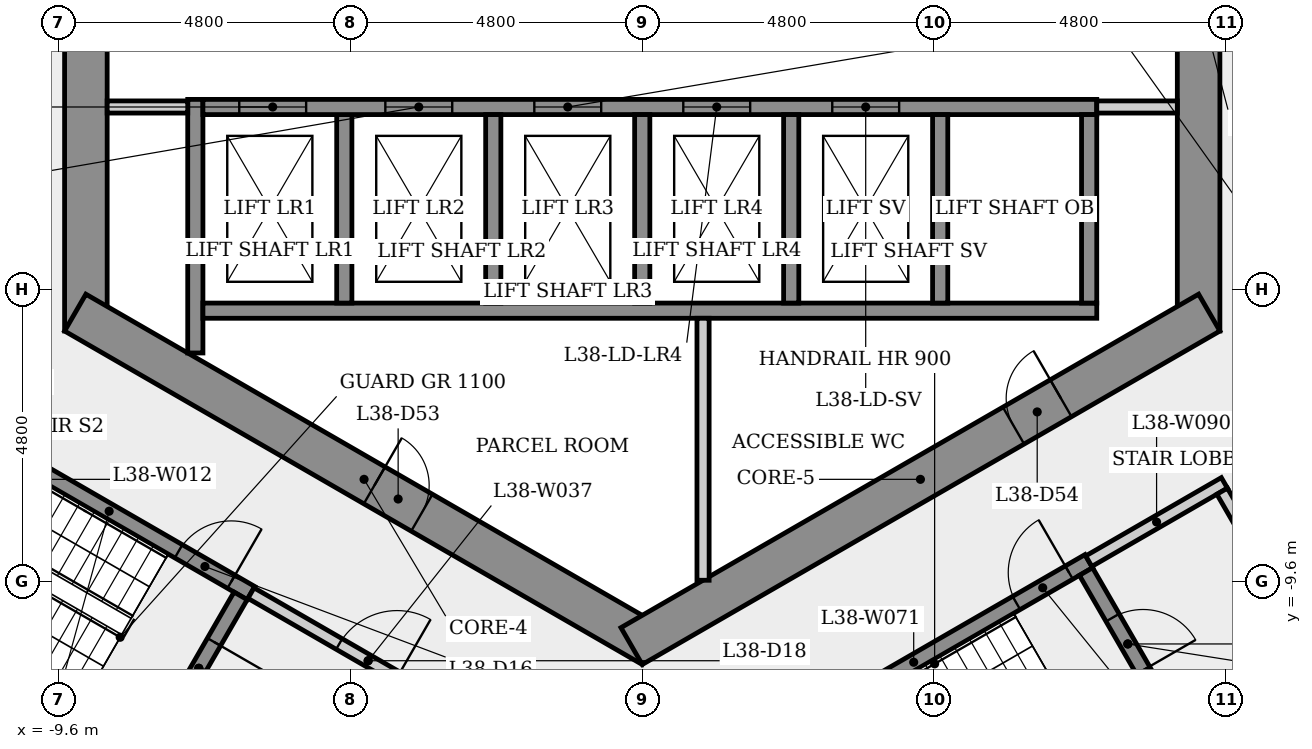
"""IFC4 building model, lengths in metres.
Left out: names, types, materials, properties, quantities, classifications, styles, units other than length and angle.
Written with IfcOpenShell. Run it as: python <this file> out.ifc"""

import sys

from ifc_helpers import new_model, si_unit, direction, frame, frame_2d, origin, place, context, subcontext, project, spatial, rectangle, extrude, element, fill, save


model = new_model("IFC4")
c1 = context("Model", 3, precision=1e-05, world=origin(), true_north=direction((0.0, 1.0)))
c2 = subcontext(c1, "Body", "Model", "MODEL_VIEW")
j1 = project(units=[si_unit("LENGTHUNIT", "METRE"), si_unit("PLANEANGLEUNIT", "RADIAN")], contexts=[c1])
p1 = place(None, origin())
s1 = spatial("IfcSite", under=j1, at=p1, CompositionType="ELEMENT")
p2 = place(p1, origin())
s2 = spatial("IfcBuilding", under=s1, at=p2, CompositionType="ELEMENT")
p3 = place(p2, frame((0.0, 0.0, 143.9)))
s3 = spatial("IfcBuildingStorey", under=s2, at=p3, CompositionType="ELEMENT", Elevation=143.9)
p4 = place(p3, frame((9.15, -5.485, 0.0), z_axis=(0.0, 0.0, 1.0), x_axis=(0.0, 1.0, 0.0)))
e1 = element("IfcWall", 1, at=p4, inside=s3, PredefinedType="SHEAR", context=c2, shape_type="SweptSolid", body=[
    extrude(rectangle(XDim=10.97, YDim=0.7, at=frame_2d((5.485, 0.0))), origin(), (0.0, 0.0, 1.0), 4.0),
])
p5 = place(p4, frame((4.685, 0.0, 0.0)))
e2 = element("IfcOpeningElement", 2, at=p5, cuts=e1, PredefinedType="OPENING", context=c2, shape_type="SweptSolid", body=[
    extrude(rectangle(XDim=1.6, YDim=2.1, at=frame_2d((0.8, 1.05))), frame((0.0, 0.36, 0.0), z_axis=(0.0, -1.0, 0.0), x_axis=(1.0, 0.0, 0.0)), (0.0, 0.0, 1.0), 0.72),
])
p6 = place(p3, frame((-9.15, 5.485, 0.0), z_axis=(0.0, 0.0, 1.0), x_axis=(0.0, -1.0, 0.0)))
e3 = element("IfcWall", 3, at=p6, inside=s3, PredefinedType="SHEAR", context=c2, shape_type="SweptSolid", body=[
    extrude(rectangle(XDim=10.97, YDim=0.7, at=frame_2d((5.485, 0.0))), origin(), (0.0, 0.0, 1.0), 4.0),
])
p7 = place(p6, frame((4.685, 0.0, 0.0)))
e4 = element("IfcOpeningElement", 4, at=p7, cuts=e3, PredefinedType="OPENING", context=c2, shape_type="SweptSolid", body=[
    extrude(rectangle(XDim=1.6, YDim=2.1, at=frame_2d((0.8, 1.05))), frame((0.0, 0.36, 0.0), z_axis=(0.0, -1.0, 0.0), x_axis=(1.0, 0.0, 0.0)), (0.0, 0.0, 1.0), 0.72),
])
p8 = place(p3, frame((-9.325, -5.182, 0.0), z_axis=(0.0, 0.0, 1.0), x_axis=(0.866023993627, -0.500002442456, 0.0)))
e5 = element("IfcWall", 5, at=p8, inside=s3, PredefinedType="SHEAR", context=c2, shape_type="SweptSolid", body=[
    extrude(rectangle(XDim=10.97, YDim=0.7, at=frame_2d((5.485, 0.0))), origin(), (0.0, 0.0, 1.0), 4.0),
])
p9 = place(p8, frame((5.682, 0.0, 0.0)))
e6 = element("IfcOpeningElement", 6, at=p9, cuts=e5, PredefinedType="OPENING", context=c2, shape_type="SweptSolid", body=[
    extrude(rectangle(XDim=0.9, YDim=2.1, at=frame_2d((0.45, 1.05))), frame((0.0, 0.36, 0.0), z_axis=(0.0, -1.0, 0.0), x_axis=(1.0, 0.0, 0.0)), (0.0, 0.0, 1.0), 0.72),
])
p10 = place(p3, frame((-0.175, -10.667, 0.0), z_axis=(0.0, 0.0, 1.0), x_axis=(0.866023993627, 0.500002442456, 0.0)))
e7 = element("IfcWall", 7, at=p10, inside=s3, PredefinedType="SHEAR", context=c2, shape_type="SweptSolid", body=[
    extrude(rectangle(XDim=10.97, YDim=0.7, at=frame_2d((5.485, 0.0))), origin(), (0.0, 0.0, 1.0), 4.0),
])
p11 = place(p10, frame((7.252, 0.0, 0.0)))
e8 = element("IfcOpeningElement", 8, at=p11, cuts=e7, PredefinedType="OPENING", context=c2, shape_type="SweptSolid", body=[
    extrude(rectangle(XDim=0.9, YDim=2.1, at=frame_2d((0.45, 1.05))), frame((0.0, 0.36, 0.0), z_axis=(0.0, -1.0, 0.0), x_axis=(1.0, 0.0, 0.0)), (0.0, 0.0, 1.0), 0.72),
])
p12 = place(p3, frame((-11.1, -7.101, 0.0), z_axis=(0.0, 0.0, 1.0), x_axis=(0.866028615007, -0.499994437958, 0.0)))
e9 = element("IfcWall", 9, at=p12, inside=s3, PredefinedType="SHEAR", context=c2, shape_type="SweptSolid", body=[
    extrude(rectangle(XDim=5.387, YDim=0.25, at=frame_2d((2.694, 0.0))), origin(), (0.0, 0.0, 1.0), 3.6),
])
p13 = place(p12, frame((4.012, 0.0, 0.0)))
e10 = element("IfcOpeningElement", 10, at=p13, cuts=e9, PredefinedType="OPENING", context=c2, shape_type="SweptSolid", body=[
    extrude(rectangle(XDim=1.0, YDim=2.1, at=frame_2d((0.5, 1.05))), frame((0.0, 0.135, 0.0), z_axis=(0.0, -1.0, 0.0), x_axis=(1.0, 0.0, 0.0)), (0.0, 0.0, 1.0), 0.27),
])
p14 = place(p3, frame((-7.935, -12.393, 0.0), z_axis=(0.0, 0.0, 1.0), x_axis=(-0.866025499775, 0.499999833739, 0.0)))
e11 = element("IfcWall", 11, at=p14, inside=s3, PredefinedType="SHEAR", context=c2, shape_type="SweptSolid", body=[
    extrude(rectangle(XDim=6.4, YDim=0.25, at=frame_2d((3.2, 0.0))), origin(), (0.0, 0.0, 1.0), 3.6),
])
p15 = place(p3, frame((-7.35, -5.846, 0.0), z_axis=(0.0, 0.0, 1.0), x_axis=(0.0, 1.0, 0.0)))
e12 = element("IfcWall", 12, at=p15, inside=s3, PredefinedType="SHEAR", context=c2, shape_type="SweptSolid", body=[
    extrude(rectangle(XDim=4.171, YDim=0.25, at=frame_2d((2.085, 0.0))), origin(), (0.0, 0.0, 1.0), 3.6),
])
p16 = place(p3, frame((-7.475, -1.8, 0.0), z_axis=(0.0, 0.0, 1.0), x_axis=(-1.0, 0.0, 0.0)))
e13 = element("IfcWall", 13, at=p16, inside=s3, PredefinedType="PARTITIONING", context=c2, shape_type="SweptSolid", body=[
    extrude(rectangle(XDim=1.325, YDim=0.2, at=frame_2d((0.663, 0.0))), origin(), (0.0, 0.0, 1.0), 3.6),
])
p17 = place(p3, frame((-6.605, -9.841, 0.0), z_axis=(0.0, 0.0, 1.0), x_axis=(-0.499996545922, -0.866027397988, 0.0)))
e14 = element("IfcWall", 14, at=p17, inside=s3, PredefinedType="SHEAR", context=c2, shape_type="SweptSolid", body=[
    extrude(rectangle(XDim=2.75, YDim=0.25, at=frame_2d((1.375, 0.0))), origin(), (0.0, 0.0, 1.0), 3.6),
])
p18 = place(p17, frame((0.875, 0.0, 0.0)))
e15 = element("IfcOpeningElement", 15, at=p18, cuts=e14, PredefinedType="OPENING", context=c2, shape_type="SweptSolid", body=[
    extrude(rectangle(XDim=1.0, YDim=2.1, at=frame_2d((0.5, 1.05))), frame((0.0, 0.135, 0.0), z_axis=(0.0, -1.0, 0.0), x_axis=(1.0, 0.0, 0.0)), (0.0, 0.0, 1.0), 0.27),
])
p19 = place(p3, frame((-6.435, -9.795, 0.0), z_axis=(0.0, 0.0, 1.0), x_axis=(0.866012907634, -0.500021643343, 0.0)))
e16 = element("IfcWall", 16, at=p19, inside=s3, PredefinedType="PARTITIONING", context=c2, shape_type="SweptSolid", body=[
    extrude(rectangle(XDim=4.45, YDim=0.2, at=frame_2d((2.225, 0.0))), origin(), (0.0, 0.0, 1.0), 3.6),
])
p20 = place(p19, frame((1.675, 0.0, 0.0)))
e17 = element("IfcOpeningElement", 17, at=p20, cuts=e16, PredefinedType="OPENING", context=c2, shape_type="SweptSolid", body=[
    extrude(rectangle(XDim=1.1, YDim=2.1, at=frame_2d((0.55, 1.05))), frame((0.0, 0.11, 0.0), z_axis=(0.0, -1.0, 0.0), x_axis=(1.0, 0.0, 0.0)), (0.0, 0.0, 1.0), 0.22),
])
p21 = place(p3, frame((-7.225, -5.15, 0.0), z_axis=(0.0, 0.0, 1.0), x_axis=(1.0, 0.0, 0.0)))
e18 = element("IfcWall", 18, at=p21, inside=s3, PredefinedType="SHEAR", context=c2, shape_type="SweptSolid", body=[
    extrude(rectangle(XDim=14.7, YDim=0.25, at=frame_2d((7.35, 0.0))), origin(), (0.0, 0.0, 1.0), 3.6),
])
p22 = place(p3, frame((-4.9, -1.925, 0.0), z_axis=(0.0, 0.0, 1.0), x_axis=(0.0, -1.0, 0.0)))
e19 = element("IfcWall", 19, at=p22, inside=s3, PredefinedType="SHEAR", context=c2, shape_type="SweptSolid", body=[
    extrude(rectangle(XDim=3.1, YDim=0.25, at=frame_2d((1.55, 0.0))), origin(), (0.0, 0.0, 1.0), 4.0),
])
p23 = place(p3, frame((-7.225, -1.8, 0.0), z_axis=(0.0, 0.0, 1.0), x_axis=(1.0, 0.0, 0.0)))
e20 = element("IfcWall", 20, at=p23, inside=s3, PredefinedType="SHEAR", context=c2, shape_type="SweptSolid", body=[
    extrude(rectangle(XDim=14.7, YDim=0.25, at=frame_2d((7.35, 0.0))), origin(), (0.0, 0.0, 1.0), 3.6),
])
p24 = place(p23, frame((0.597, 0.0, 0.0)))
e21 = element("IfcOpeningElement", 21, at=p24, cuts=e20, PredefinedType="OPENING", context=c2, shape_type="SweptSolid", body=[
    extrude(rectangle(XDim=1.1, YDim=2.1, at=frame_2d((0.55, 1.05))), frame((0.0, 0.135, 0.0), z_axis=(0.0, -1.0, 0.0), x_axis=(1.0, 0.0, 0.0)), (0.0, 0.0, 1.0), 0.27),
])
p25 = place(p23, frame((3.0, 0.0, 0.0)))
e22 = element("IfcOpeningElement", 22, at=p25, cuts=e20, PredefinedType="OPENING", context=c2, shape_type="SweptSolid", body=[
    extrude(rectangle(XDim=1.1, YDim=2.1, at=frame_2d((0.55, 1.05))), frame((0.0, 0.135, 0.0), z_axis=(0.0, -1.0, 0.0), x_axis=(1.0, 0.0, 0.0)), (0.0, 0.0, 1.0), 0.27),
])
p26 = place(p23, frame((5.45, 0.0, 0.0)))
e23 = element("IfcOpeningElement", 23, at=p26, cuts=e20, PredefinedType="OPENING", context=c2, shape_type="SweptSolid", body=[
    extrude(rectangle(XDim=1.1, YDim=2.1, at=frame_2d((0.55, 1.05))), frame((0.0, 0.135, 0.0), z_axis=(0.0, -1.0, 0.0), x_axis=(1.0, 0.0, 0.0)), (0.0, 0.0, 1.0), 0.27),
])
p27 = place(p23, frame((7.9, 0.0, 0.0)))
e24 = element("IfcOpeningElement", 24, at=p27, cuts=e20, PredefinedType="OPENING", context=c2, shape_type="SweptSolid", body=[
    extrude(rectangle(XDim=1.1, YDim=2.1, at=frame_2d((0.55, 1.05))), frame((0.0, 0.135, 0.0), z_axis=(0.0, -1.0, 0.0), x_axis=(1.0, 0.0, 0.0)), (0.0, 0.0, 1.0), 0.27),
])
p28 = place(p23, frame((10.35, 0.0, 0.0)))
e25 = element("IfcOpeningElement", 25, at=p28, cuts=e20, PredefinedType="OPENING", context=c2, shape_type="SweptSolid", body=[
    extrude(rectangle(XDim=1.1, YDim=2.1, at=frame_2d((0.55, 1.05))), frame((0.0, 0.135, 0.0), z_axis=(0.0, -1.0, 0.0), x_axis=(1.0, 0.0, 0.0)), (0.0, 0.0, 1.0), 0.27),
])
for number, where, z_axis, x_axis in (
    (26, (-2.45, -1.925, 0.0), (0.0, 0.0, 1.0), (0.0, -1.0, 0.0)),
    (27, (0.0, -1.925, 0.0), (0.0, 0.0, 1.0), (0.0, -1.0, 0.0)),
):
    element("IfcWall", number, at=place(p3, frame(where, z_axis=z_axis, x_axis=x_axis)), inside=s3, PredefinedType="SHEAR", context=c2, shape_type="SweptSolid", body=[
        extrude(rectangle(XDim=3.1, YDim=0.25, at=frame_2d((1.55, 0.0))), origin(), (0.0, 0.0, 1.0), 4.0),
    ])
p29 = place(p3, frame((1.0, -5.275, 0.0), z_axis=(0.0, 0.0, 1.0), x_axis=(0.0, -1.0, 0.0)))
e28 = element("IfcWall", 28, at=p29, inside=s3, PredefinedType="PARTITIONING", context=c2, shape_type="SweptSolid", body=[
    extrude(rectangle(XDim=4.309, YDim=0.2, at=frame_2d((2.155, 0.0))), origin(), (0.0, 0.0, 1.0), 3.6),
])
p30 = place(p3, frame((1.585, -12.595, 0.0), z_axis=(0.0, 0.0, 1.0), x_axis=(0.866036417653, 0.499980922934, 0.0)))
e29 = element("IfcWall", 29, at=p30, inside=s3, PredefinedType="SHEAR", context=c2, shape_type="SweptSolid", body=[
    extrude(rectangle(XDim=6.65, YDim=0.25, at=frame_2d((3.325, 0.0))), origin(), (0.0, 0.0, 1.0), 3.6),
])
p31 = place(p30, frame((5.275, 0.0, 0.0)))
e30 = element("IfcOpeningElement", 30, at=p31, cuts=e29, PredefinedType="OPENING", context=c2, shape_type="SweptSolid", body=[
    extrude(rectangle(XDim=1.0, YDim=2.1, at=frame_2d((0.5, 1.05))), frame((0.0, 0.135, 0.0), z_axis=(0.0, -1.0, 0.0), x_axis=(1.0, 0.0, 0.0)), (0.0, 0.0, 1.0), 0.27),
])
for number, where, z_axis, x_axis in (
    (31, (2.45, -1.925, 0.0), (0.0, 0.0, 1.0), (0.0, -1.0, 0.0)),
    (32, (4.9, -1.925, 0.0), (0.0, 0.0, 1.0), (0.0, -1.0, 0.0)),
):
    element("IfcWall", number, at=place(p3, frame(where, z_axis=z_axis, x_axis=x_axis)), inside=s3, PredefinedType="SHEAR", context=c2, shape_type="SweptSolid", body=[
        extrude(rectangle(XDim=3.1, YDim=0.25, at=frame_2d((1.55, 0.0))), origin(), (0.0, 0.0, 1.0), 4.0),
    ])
p32 = place(p3, frame((7.298, -9.441, 0.0), z_axis=(0.0, 0.0, 1.0), x_axis=(0.500034990121, -0.866005201286, 0.0)))
e33 = element("IfcWall", 33, at=p32, inside=s3, PredefinedType="SHEAR", context=c2, shape_type="SweptSolid", body=[
    extrude(rectangle(XDim=2.75, YDim=0.25, at=frame_2d((1.375, 0.0))), origin(), (0.0, 0.0, 1.0), 3.6),
])
p33 = place(p32, frame((0.875, 0.0, 0.0)))
e34 = element("IfcOpeningElement", 34, at=p33, cuts=e33, PredefinedType="OPENING", context=c2, shape_type="SweptSolid", body=[
    extrude(rectangle(XDim=1.0, YDim=2.1, at=frame_2d((0.5, 1.05))), frame((0.0, 0.135, 0.0), z_axis=(0.0, -1.0, 0.0), x_axis=(1.0, 0.0, 0.0)), (0.0, 0.0, 1.0), 0.27),
])
p34 = place(p3, frame((7.344, -9.27, 0.0), z_axis=(0.0, 0.0, 1.0), x_axis=(0.866005588531, 0.500034319456, 0.0)))
e35 = element("IfcWall", 35, at=p34, inside=s3, PredefinedType="PARTITIONING", context=c2, shape_type="SweptSolid", body=[
    extrude(rectangle(XDim=2.575, YDim=0.2, at=frame_2d((1.288, 0.0))), origin(), (0.0, 0.0, 1.0), 3.6),
])
p35 = place(p3, frame((7.35, -1.925, 0.0), z_axis=(0.0, 0.0, 1.0), x_axis=(0.0, -1.0, 0.0)))
e36 = element("IfcWall", 36, at=p35, inside=s3, PredefinedType="SHEAR", context=c2, shape_type="SweptSolid", body=[
    extrude(rectangle(XDim=3.1, YDim=0.25, at=frame_2d((1.55, 0.0))), origin(), (0.0, 0.0, 1.0), 4.0),
])
p36 = place(p3, frame((8.8, -1.8, 0.0), z_axis=(0.0, 0.0, 1.0), x_axis=(-1.0, 0.0, 0.0)))
e37 = element("IfcWall", 37, at=p36, inside=s3, PredefinedType="PARTITIONING", context=c2, shape_type="SweptSolid", body=[
    extrude(rectangle(XDim=1.325, YDim=0.2, at=frame_2d((0.663, 0.0))), origin(), (0.0, 0.0, 1.0), 3.6),
])
p37 = place(p3, frame((9.537, -8.119, 0.0), z_axis=(0.0, 0.0, 1.0), x_axis=(0.499990139034, -0.866031096941, 0.0)))
e38 = element("IfcWall", 38, at=p37, inside=s3, PredefinedType="PARTITIONING", context=c2, shape_type="SweptSolid", body=[
    extrude(rectangle(XDim=3.0, YDim=0.2, at=frame_2d((1.5, 0.0))), origin(), (0.0, 0.0, 1.0), 3.6),
])
p38 = place(p37, frame((0.935, 0.0, 0.0)))
e39 = element("IfcOpeningElement", 39, at=p38, cuts=e38, PredefinedType="OPENING", context=c2, shape_type="SweptSolid", body=[
    extrude(rectangle(XDim=1.0, YDim=2.1, at=frame_2d((0.5, 1.05))), frame((0.0, 0.11, 0.0), z_axis=(0.0, -1.0, 0.0), x_axis=(1.0, 0.0, 0.0)), (0.0, 0.0, 1.0), 0.22),
])
p39 = place(p3, frame((10.901, -10.681, 0.0), z_axis=(0.0, 0.0, 1.0), x_axis=(-0.866007538022, -0.500030943131, 0.0)))
e40 = element("IfcWall", 40, at=p39, inside=s3, PredefinedType="PLUMBINGWALL", context=c2, shape_type="SweptSolid", body=[
    extrude(rectangle(XDim=2.375, YDim=0.2, at=frame_2d((1.188, 0.0))), origin(), (0.0, 0.0, 1.0), 3.6),
])
p40 = place(p24, origin())
e41 = element("IfcDoor", 41, at=p40, inside=s3, OperationType="SLIDING_TO_LEFT", PredefinedType="DOOR", context=c2, shape_type="SweptSolid", body=[
    extrude(rectangle(XDim=1.1, YDim=2.1, at=frame_2d((0.55, 1.05))), frame((0.0, 0.025, 0.0), z_axis=(0.0, -1.0, 0.0), x_axis=(1.0, 0.0, 0.0)), (0.0, 0.0, 1.0), 0.05),
])
fill(e21, e41)
p41 = place(p25, origin())
e42 = element("IfcDoor", 42, at=p41, inside=s3, OperationType="SLIDING_TO_LEFT", PredefinedType="DOOR", context=c2, shape_type="SweptSolid", body=[
    extrude(rectangle(XDim=1.1, YDim=2.1, at=frame_2d((0.55, 1.05))), frame((0.0, 0.025, 0.0), z_axis=(0.0, -1.0, 0.0), x_axis=(1.0, 0.0, 0.0)), (0.0, 0.0, 1.0), 0.05),
])
fill(e22, e42)
p42 = place(p26, origin())
e43 = element("IfcDoor", 43, at=p42, inside=s3, OperationType="SLIDING_TO_LEFT", PredefinedType="DOOR", context=c2, shape_type="SweptSolid", body=[
    extrude(rectangle(XDim=1.1, YDim=2.1, at=frame_2d((0.55, 1.05))), frame((0.0, 0.025, 0.0), z_axis=(0.0, -1.0, 0.0), x_axis=(1.0, 0.0, 0.0)), (0.0, 0.0, 1.0), 0.05),
])
fill(e23, e43)
p43 = place(p27, origin())
e44 = element("IfcDoor", 44, at=p43, inside=s3, OperationType="SLIDING_TO_LEFT", PredefinedType="DOOR", context=c2, shape_type="SweptSolid", body=[
    extrude(rectangle(XDim=1.1, YDim=2.1, at=frame_2d((0.55, 1.05))), frame((0.0, 0.025, 0.0), z_axis=(0.0, -1.0, 0.0), x_axis=(1.0, 0.0, 0.0)), (0.0, 0.0, 1.0), 0.05),
])
fill(e24, e44)
p44 = place(p28, origin())
e45 = element("IfcDoor", 45, at=p44, inside=s3, OperationType="SLIDING_TO_LEFT", PredefinedType="DOOR", context=c2, shape_type="SweptSolid", body=[
    extrude(rectangle(XDim=1.1, YDim=2.1, at=frame_2d((0.55, 1.05))), frame((0.0, 0.025, 0.0), z_axis=(0.0, -1.0, 0.0), x_axis=(1.0, 0.0, 0.0)), (0.0, 0.0, 1.0), 0.05),
])
fill(e25, e45)
p45 = place(p13, origin())
e46 = element("IfcDoor", 46, at=p45, inside=s3, OperationType="SINGLE_SWING_RIGHT", PredefinedType="DOOR", context=c2, shape_type="SweptSolid", body=[
    extrude(rectangle(XDim=1.0, YDim=2.1, at=frame_2d((0.5, 1.05))), frame((0.0, 0.025, 0.0), z_axis=(0.0, -1.0, 0.0), x_axis=(1.0, 0.0, 0.0)), (0.0, 0.0, 1.0), 0.05),
])
fill(e10, e46)
p46 = place(p18, origin())
e47 = element("IfcDoor", 47, at=p46, inside=s3, OperationType="SINGLE_SWING_LEFT", PredefinedType="DOOR", context=c2, shape_type="SweptSolid", body=[
    extrude(rectangle(XDim=1.0, YDim=2.1, at=frame_2d((0.5, 1.05))), frame((0.0, 0.025, 0.0), z_axis=(0.0, -1.0, 0.0), x_axis=(1.0, 0.0, 0.0)), (0.0, 0.0, 1.0), 0.05),
])
fill(e15, e47)
p47 = place(p20, origin())
e48 = element("IfcDoor", 48, at=p47, inside=s3, OperationType="SINGLE_SWING_RIGHT", PredefinedType="DOOR", context=c2, shape_type="SweptSolid", body=[
    extrude(rectangle(XDim=1.1, YDim=2.1, at=frame_2d((0.55, 1.05))), frame((0.0, 0.025, 0.0), z_axis=(0.0, -1.0, 0.0), x_axis=(1.0, 0.0, 0.0)), (0.0, 0.0, 1.0), 0.05),
])
fill(e17, e48)
p48 = place(p31, origin())
e49 = element("IfcDoor", 49, at=p48, inside=s3, OperationType="SINGLE_SWING_RIGHT", PredefinedType="DOOR", context=c2, shape_type="SweptSolid", body=[
    extrude(rectangle(XDim=1.0, YDim=2.1, at=frame_2d((0.5, 1.05))), frame((0.0, 0.025, 0.0), z_axis=(0.0, -1.0, 0.0), x_axis=(1.0, 0.0, 0.0)), (0.0, 0.0, 1.0), 0.05),
])
fill(e30, e49)
p49 = place(p33, origin())
e50 = element("IfcDoor", 50, at=p49, inside=s3, OperationType="SINGLE_SWING_RIGHT", PredefinedType="DOOR", context=c2, shape_type="SweptSolid", body=[
    extrude(rectangle(XDim=1.0, YDim=2.1, at=frame_2d((0.5, 1.05))), frame((0.0, 0.025, 0.0), z_axis=(0.0, -1.0, 0.0), x_axis=(1.0, 0.0, 0.0)), (0.0, 0.0, 1.0), 0.05),
])
fill(e34, e50)
p50 = place(p9, origin())
e51 = element("IfcDoor", 51, at=p50, inside=s3, OperationType="SINGLE_SWING_LEFT", PredefinedType="DOOR", context=c2, shape_type="SweptSolid", body=[
    extrude(rectangle(XDim=0.9, YDim=2.1, at=frame_2d((0.45, 1.05))), frame((0.0, 0.025, 0.0), z_axis=(0.0, -1.0, 0.0), x_axis=(1.0, 0.0, 0.0)), (0.0, 0.0, 1.0), 0.05),
])
fill(e6, e51)
p51 = place(p11, origin())
e52 = element("IfcDoor", 52, at=p51, inside=s3, OperationType="SINGLE_SWING_RIGHT", PredefinedType="DOOR", context=c2, shape_type="SweptSolid", body=[
    extrude(rectangle(XDim=0.9, YDim=2.1, at=frame_2d((0.45, 1.05))), frame((0.0, 0.025, 0.0), z_axis=(0.0, -1.0, 0.0), x_axis=(1.0, 0.0, 0.0)), (0.0, 0.0, 1.0), 0.05),
])
fill(e8, e52)
save(model, sys.argv[1])
